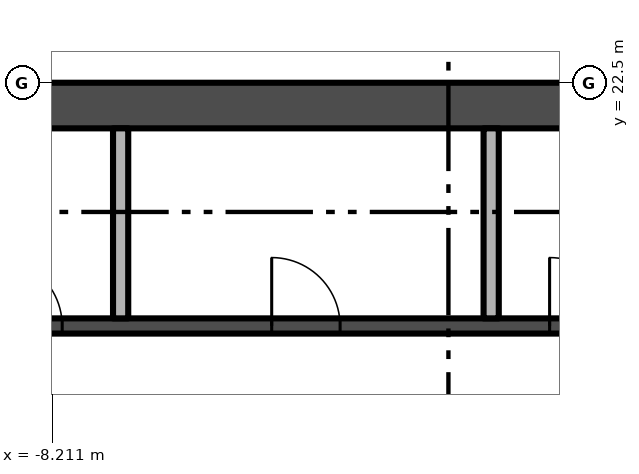
"""IFC4 building model, lengths in metres.
Left out: names, types, materials, properties, quantities, classifications, styles, units other than length and angle.
Written with IfcOpenShell. Run it as: python <this file> out.ifc"""

import sys

from ifc_helpers import new_model, si_unit, direction, frame, frame_2d, origin, place, context, subcontext, project, spatial, rectangle, extrude, element, fill, save


model = new_model("IFC4")
c1 = context("Model", 3, precision=1e-05, world=origin(), true_north=direction((0.0, 1.0)))
c2 = subcontext(c1, "Body", "Model", "MODEL_VIEW")
j1 = project(units=[si_unit("LENGTHUNIT", "METRE"), si_unit("PLANEANGLEUNIT", "RADIAN")], contexts=[c1])
p1 = place(None, origin())
s1 = spatial("IfcSite", under=j1, at=p1, CompositionType="ELEMENT")
p2 = place(p1, origin())
s2 = spatial("IfcBuilding", under=s1, at=p2, CompositionType="ELEMENT")
p3 = place(p2, frame((0.0, 0.0, 269.2)))
s3 = spatial("IfcBuildingStorey", under=s2, at=p3, CompositionType="ELEMENT", Elevation=269.2)
p4 = place(p3, frame((13.5, 22.2, -0.3), z_axis=(0.0, 0.0, 1.0), x_axis=(-1.0, 0.0, 0.0)))
e1 = element("IfcWall", 1, at=p4, inside=s3, PredefinedType="SHEAR", context=c2, shape_type="SweptSolid", body=[
    extrude(rectangle(XDim=27.0, YDim=0.6, at=frame_2d((13.5, 0.0))), origin(), (0.0, 0.0, 1.0), 3.8),
])
p5 = place(p3, frame((-9.85, 19.3, 0.0), z_axis=(0.0, 0.0, 1.0), x_axis=(1.0, 0.0, 0.0)))
e2 = element("IfcWall", 2, at=p5, inside=s3, PredefinedType="SHEAR", context=c2, shape_type="SweptSolid", body=[
    extrude(rectangle(XDim=19.7, YDim=0.2, at=frame_2d((9.85, 0.0))), origin(), (0.0, 0.0, 1.0), 3.5),
])
p6 = place(p5, frame((10.519, 0.0, 0.0)))
e3 = element("IfcOpeningElement", 3, at=p6, cuts=e2, PredefinedType="OPENING", context=c2, shape_type="SweptSolid", body=[
    extrude(rectangle(XDim=1.1, YDim=2.1, at=frame_2d((0.55, 1.05))), frame((0.0, 0.11, 0.0), z_axis=(0.0, -1.0, 0.0), x_axis=(1.0, 0.0, 0.0)), (0.0, 0.0, 1.0), 0.22),
])
p7 = place(p5, frame((12.956, 0.0, 0.0)))
e4 = element("IfcOpeningElement", 4, at=p7, cuts=e2, PredefinedType="OPENING", context=c2, shape_type="SweptSolid", body=[
    extrude(rectangle(XDim=1.1, YDim=2.1, at=frame_2d((0.55, 1.05))), frame((0.0, 0.11, 0.0), z_axis=(0.0, -1.0, 0.0), x_axis=(1.0, 0.0, 0.0)), (0.0, 0.0, 1.0), 0.22),
])
p8 = place(p5, frame((15.394, 0.0, 0.0)))
e5 = element("IfcOpeningElement", 5, at=p8, cuts=e2, PredefinedType="OPENING", context=c2, shape_type="SweptSolid", body=[
    extrude(rectangle(XDim=1.1, YDim=2.1, at=frame_2d((0.55, 1.05))), frame((0.0, 0.11, 0.0), z_axis=(0.0, -1.0, 0.0), x_axis=(1.0, 0.0, 0.0)), (0.0, 0.0, 1.0), 0.22),
])
p9 = place(p5, frame((17.831, 0.0, 0.0)))
e6 = element("IfcOpeningElement", 6, at=p9, cuts=e2, PredefinedType="OPENING", context=c2, shape_type="SweptSolid", body=[
    extrude(rectangle(XDim=1.1, YDim=2.1, at=frame_2d((0.55, 1.05))), frame((0.0, 0.11, 0.0), z_axis=(0.0, -1.0, 0.0), x_axis=(1.0, 0.0, 0.0)), (0.0, 0.0, 1.0), 0.22),
])
p10 = place(p5, frame((0.869, 0.0, 0.0)))
e7 = element("IfcOpeningElement", 7, at=p10, cuts=e2, PredefinedType="OPENING", context=c2, shape_type="SweptSolid", body=[
    extrude(rectangle(XDim=0.9, YDim=2.1, at=frame_2d((0.45, 1.05))), frame((0.0, 0.11, 0.0), z_axis=(0.0, -1.0, 0.0), x_axis=(1.0, 0.0, 0.0)), (0.0, 0.0, 1.0), 0.22),
])
p11 = place(p5, frame((4.525, 0.0, 0.0)))
e8 = element("IfcOpeningElement", 8, at=p11, cuts=e2, PredefinedType="OPENING", context=c2, shape_type="SweptSolid", body=[
    extrude(rectangle(XDim=0.9, YDim=2.1, at=frame_2d((0.45, 1.05))), frame((0.0, 0.11, 0.0), z_axis=(0.0, -1.0, 0.0), x_axis=(1.0, 0.0, 0.0)), (0.0, 0.0, 1.0), 0.22),
])
p12 = place(p5, frame((8.181, 0.0, 0.0)))
e9 = element("IfcOpeningElement", 9, at=p12, cuts=e2, PredefinedType="OPENING", context=c2, shape_type="SweptSolid", body=[
    extrude(rectangle(XDim=0.9, YDim=2.1, at=frame_2d((0.45, 1.05))), frame((0.0, 0.11, 0.0), z_axis=(0.0, -1.0, 0.0), x_axis=(1.0, 0.0, 0.0)), (0.0, 0.0, 1.0), 0.22),
])
for number, where, z_axis, x_axis in (
    (10, (-7.312, 19.4, 0.0), (0.0, 0.0, 1.0), (0.0, 1.0, 0.0)),
    (11, (-2.438, 19.4, 0.0), (0.0, 0.0, 1.0), (0.0, 1.0, 0.0)),
):
    element("IfcWall", number, at=place(p3, frame(where, z_axis=z_axis, x_axis=x_axis)), inside=s3, PredefinedType="PARTITIONING", context=c2, shape_type="SweptSolid", body=[
        extrude(rectangle(XDim=2.5, YDim=0.2, at=frame_2d((1.25, 0.0))), origin(), (0.0, 0.0, 1.0), 3.5),
    ])
p13 = place(p10, origin())
e12 = element("IfcDoor", 12, at=p13, inside=s3, OperationType="SINGLE_SWING_LEFT", PredefinedType="DOOR", context=c2, shape_type="SweptSolid", body=[
    extrude(rectangle(XDim=0.9, YDim=2.1, at=frame_2d((0.45, 1.05))), frame((0.0, 0.025, 0.0), z_axis=(0.0, -1.0, 0.0), x_axis=(1.0, 0.0, 0.0)), (0.0, 0.0, 1.0), 0.05),
])
fill(e7, e12)
p14 = place(p11, origin())
e13 = element("IfcDoor", 13, at=p14, inside=s3, OperationType="SINGLE_SWING_LEFT", PredefinedType="DOOR", context=c2, shape_type="SweptSolid", body=[
    extrude(rectangle(XDim=0.9, YDim=2.1, at=frame_2d((0.45, 1.05))), frame((0.0, 0.025, 0.0), z_axis=(0.0, -1.0, 0.0), x_axis=(1.0, 0.0, 0.0)), (0.0, 0.0, 1.0), 0.05),
])
fill(e8, e13)
p15 = place(p12, origin())
e14 = element("IfcDoor", 14, at=p15, inside=s3, OperationType="SINGLE_SWING_LEFT", PredefinedType="DOOR", context=c2, shape_type="SweptSolid", body=[
    extrude(rectangle(XDim=0.9, YDim=2.1, at=frame_2d((0.45, 1.05))), frame((0.0, 0.025, 0.0), z_axis=(0.0, -1.0, 0.0), x_axis=(1.0, 0.0, 0.0)), (0.0, 0.0, 1.0), 0.05),
])
fill(e9, e14)
save(model, sys.argv[1])
